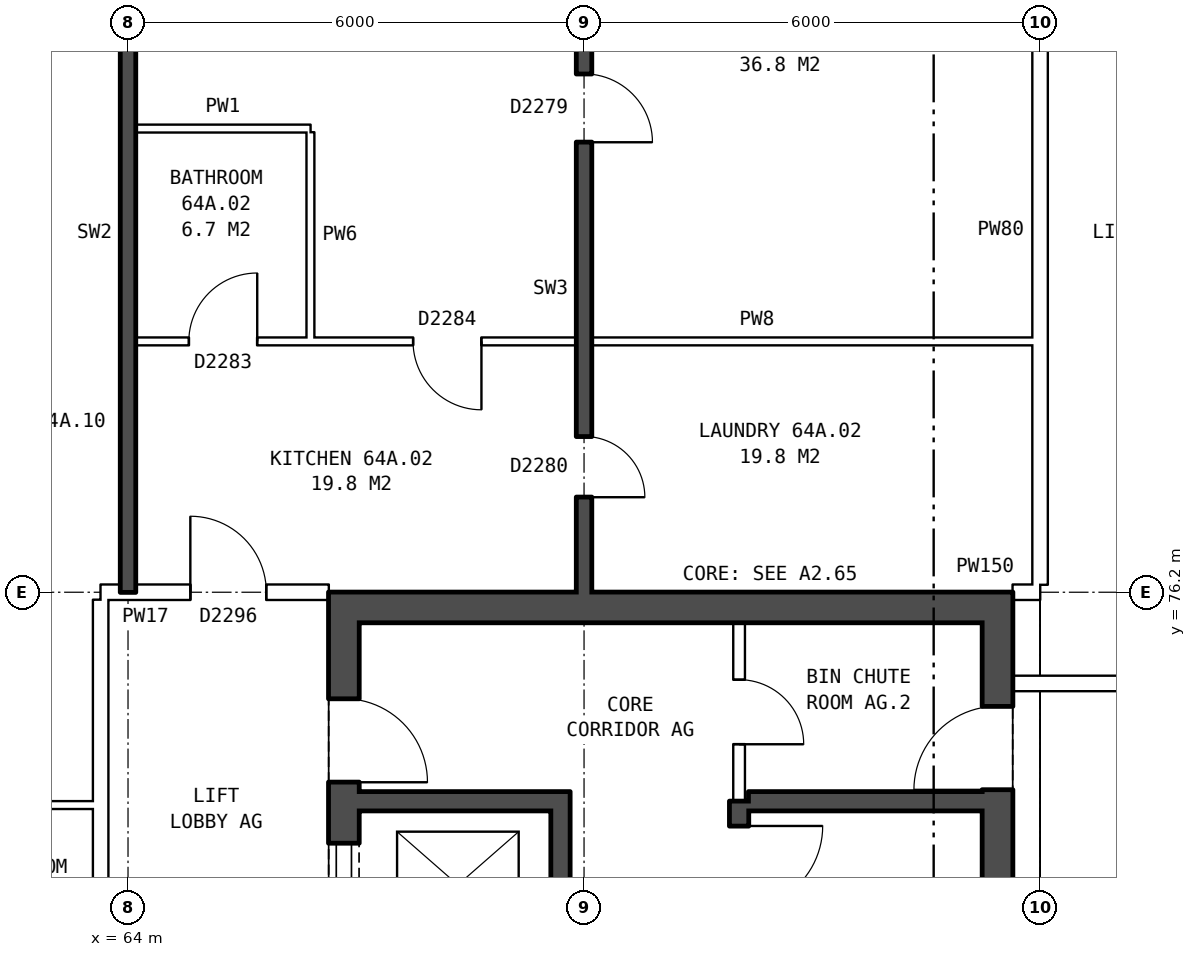
"""IFC4 building model, lengths in metres.
Left out: names, types, materials, properties, quantities, classifications, styles, units other than length and angle.
Written with IfcOpenShell. Run it as: python <this file> out.ifc"""

import sys

from ifc_helpers import new_model, si_unit, direction, frame, frame_2d, origin, place, context, subcontext, project, spatial, rectangle, extrude, element, fill, save


model = new_model("IFC4")
c1 = context("Model", 3, precision=1e-05, world=origin(), true_north=direction((0.0, 1.0)))
c2 = subcontext(c1, "Body", "Model", "MODEL_VIEW")
j1 = project(units=[si_unit("LENGTHUNIT", "METRE"), si_unit("PLANEANGLEUNIT", "RADIAN")], contexts=[c1])
p1 = place(None, origin())
s1 = spatial("IfcSite", under=j1, at=p1, CompositionType="ELEMENT")
p2 = place(p1, origin())
s2 = spatial("IfcBuilding", under=s1, at=p2, CompositionType="ELEMENT")
p3 = place(p2, frame((0.0, 0.0, 227.6)))
s3 = spatial("IfcBuildingStorey", under=s2, at=p3, CompositionType="ELEMENT", Elevation=227.6)
p4 = place(p3, frame((66.84, 63.8, 0.0), z_axis=(0.0, 0.0, 1.0), x_axis=(0.0, 1.0, 0.0)))
e1 = element("IfcWall", 1, at=p4, inside=s3, PredefinedType="SHEAR", context=c2, shape_type="SweptSolid", body=[
    extrude(rectangle(XDim=12.4, YDim=0.4, at=frame_2d((6.2, 0.0))), origin(), (0.0, 0.0, 1.0), 2.85),
])
p5 = place(p4, frame((1.325, 0.0, 0.0)))
e2 = element("IfcOpeningElement", 2, at=p5, cuts=e1, PredefinedType="OPENING", context=c2, shape_type="SweptSolid", body=[
    extrude(rectangle(XDim=1.1, YDim=2.1, at=frame_2d((0.55, 1.05))), frame((0.0, 0.21, 0.0), z_axis=(0.0, -1.0, 0.0), x_axis=(1.0, 0.0, 0.0)), (0.0, 0.0, 1.0), 0.42),
])
p6 = place(p4, frame((3.6, 0.0, 0.0)))
e3 = element("IfcOpeningElement", 3, at=p6, cuts=e1, PredefinedType="OPENING", context=c2, shape_type="SweptSolid", body=[
    extrude(rectangle(XDim=1.1, YDim=2.1, at=frame_2d((0.55, 1.05))), frame((0.0, 0.21, 0.0), z_axis=(0.0, -1.0, 0.0), x_axis=(1.0, 0.0, 0.0)), (0.0, 0.0, 1.0), 0.42),
])
p7 = place(p4, frame((5.8, 0.0, 0.0)))
e4 = element("IfcOpeningElement", 4, at=p7, cuts=e1, PredefinedType="OPENING", context=c2, shape_type="SweptSolid", body=[
    extrude(rectangle(XDim=1.1, YDim=2.1, at=frame_2d((0.55, 1.05))), frame((0.0, 0.21, 0.0), z_axis=(0.0, -1.0, 0.0), x_axis=(1.0, 0.0, 0.0)), (0.0, 0.0, 1.0), 0.42),
])
p8 = place(p4, frame((8.0, 0.0, 0.0)))
e5 = element("IfcOpeningElement", 5, at=p8, cuts=e1, PredefinedType="OPENING", context=c2, shape_type="SweptSolid", body=[
    extrude(rectangle(XDim=1.1, YDim=2.1, at=frame_2d((0.55, 1.05))), frame((0.0, 0.21, 0.0), z_axis=(0.0, -1.0, 0.0), x_axis=(1.0, 0.0, 0.0)), (0.0, 0.0, 1.0), 0.42),
])
p9 = place(p4, frame((9.9, 0.0, 0.0)))
e6 = element("IfcOpeningElement", 6, at=p9, cuts=e1, PredefinedType="OPENING", context=c2, shape_type="SweptSolid", body=[
    extrude(rectangle(XDim=1.1, YDim=2.1, at=frame_2d((0.55, 1.05))), frame((0.0, 0.21, 0.0), z_axis=(0.0, -1.0, 0.0), x_axis=(1.0, 0.0, 0.0)), (0.0, 0.0, 1.0), 0.42),
])
p10 = place(p3, frame((75.44, 63.8, 0.0), z_axis=(0.0, 0.0, 1.0), x_axis=(0.0, 1.0, 0.0)))
e7 = element("IfcWall", 7, at=p10, inside=s3, PredefinedType="SHEAR", context=c2, shape_type="SweptSolid", body=[
    extrude(rectangle(XDim=12.4, YDim=0.4, at=frame_2d((6.2, 0.0))), origin(), (0.0, 0.0, 1.0), 2.85),
])
p11 = place(p10, frame((9.8, 0.0, 0.0)))
e8 = element("IfcOpeningElement", 8, at=p11, cuts=e7, PredefinedType="OPENING", context=c2, shape_type="SweptSolid", body=[
    extrude(rectangle(XDim=1.1, YDim=2.1, at=frame_2d((0.55, 1.05))), frame((0.0, 0.21, 0.0), z_axis=(0.0, -1.0, 0.0), x_axis=(1.0, 0.0, 0.0)), (0.0, 0.0, 1.0), 0.42),
])
p12 = place(p3, frame((67.04, 76.0, 0.0), z_axis=(0.0, 0.0, 1.0), x_axis=(1.0, 0.0, 0.0)))
e9 = element("IfcWall", 9, at=p12, inside=s3, PredefinedType="SHEAR", context=c2, shape_type="SweptSolid", body=[
    extrude(rectangle(XDim=8.2, YDim=0.4, at=frame_2d((4.1, 0.0))), origin(), (0.0, 0.0, 1.0), 2.85),
])
p13 = place(p3, frame((67.04, 73.45, 0.0), z_axis=(0.0, 0.0, 1.0), x_axis=(1.0, 0.0, 0.0)))
e10 = element("IfcWall", 10, at=p13, inside=s3, PredefinedType="SHEAR", context=c2, shape_type="SweptSolid", body=[
    extrude(rectangle(XDim=2.525, YDim=0.25, at=frame_2d((1.262, 0.0))), origin(), (0.0, 0.0, 1.0), 2.85),
])
p14 = place(p3, frame((72.165, 73.45, 0.0), z_axis=(0.0, 0.0, 1.0), x_axis=(1.0, 0.0, 0.0)))
e11 = element("IfcWall", 11, at=p14, inside=s3, PredefinedType="SHEAR", context=c2, shape_type="SweptSolid", body=[
    extrude(rectangle(XDim=3.075, YDim=0.25, at=frame_2d((1.538, 0.0))), origin(), (0.0, 0.0, 1.0), 2.85),
])
p15 = place(p3, frame((69.69, 66.975, 0.0), z_axis=(0.0, 0.0, 1.0), x_axis=(0.0, 1.0, 0.0)))
e12 = element("IfcWall", 12, at=p15, inside=s3, PredefinedType="SHEAR", context=c2, shape_type="SweptSolid", body=[
    extrude(rectangle(XDim=6.6, YDim=0.25, at=frame_2d((3.3, 0.0))), origin(), (0.0, 0.0, 1.0), 2.85),
])
p16 = place(p3, frame((72.04, 66.225, 0.0), z_axis=(0.0, 0.0, 1.0), x_axis=(0.0, 1.0, 0.0)))
e13 = element("IfcWall", 13, at=p16, inside=s3, PredefinedType="SHEAR", context=c2, shape_type="SweptSolid", body=[
    extrude(rectangle(XDim=7.225, YDim=0.25, at=frame_2d((3.612, 0.0))), origin(), (0.0, 0.0, 1.0), 2.85),
])
p17 = place(p16, frame((5.8, 0.0, 0.0)))
e14 = element("IfcOpeningElement", 14, at=p17, cuts=e13, PredefinedType="OPENING", context=c2, shape_type="SweptSolid", body=[
    extrude(rectangle(XDim=1.1, YDim=2.1, at=frame_2d((0.55, 1.05))), frame((0.0, 0.135, 0.0), z_axis=(0.0, -1.0, 0.0), x_axis=(1.0, 0.0, 0.0)), (0.0, 0.0, 1.0), 0.27),
])
p18 = place(p3, frame((72.04, 73.45, 0.0), z_axis=(0.0, 0.0, 1.0), x_axis=(0.0, 1.0, 0.0)))
e15 = element("IfcWall", 15, at=p18, inside=s3, PredefinedType="PARTITIONING", context=c2, shape_type="SweptSolid", body=[
    extrude(rectangle(XDim=2.35, YDim=0.15, at=frame_2d((1.175, 0.0))), origin(), (0.0, 0.0, 1.0), 2.85),
])
p19 = place(p18, frame((0.75, 0.0, 0.0)))
e16 = element("IfcOpeningElement", 16, at=p19, cuts=e15, PredefinedType="OPENING", context=c2, shape_type="SweptSolid", body=[
    extrude(rectangle(XDim=0.85, YDim=2.1, at=frame_2d((0.425, 1.05))), frame((0.0, 0.085, 0.0), z_axis=(0.0, -1.0, 0.0), x_axis=(1.0, 0.0, 0.0)), (0.0, 0.0, 1.0), 0.17),
])
p20 = place(p3, frame((63.64, 63.9, 0.0), z_axis=(0.0, 0.0, 1.0), x_axis=(0.0, 1.0, 0.0)))
e17 = element("IfcWall", 17, at=p20, inside=s3, PredefinedType="PARTITIONING", context=c2, shape_type="SweptSolid", body=[
    extrude(rectangle(XDim=12.2, YDim=0.2, at=frame_2d((6.1, 0.0))), origin(), (0.0, 0.0, 1.0), 2.85),
])
p21 = place(p20, frame((5.1, 0.0, 0.0)))
e18 = element("IfcOpeningElement", 18, at=p21, cuts=e17, PredefinedType="OPENING", context=c2, shape_type="SweptSolid", body=[
    extrude(rectangle(XDim=2.0, YDim=2.1, at=frame_2d((1.0, 1.05))), frame((0.0, 0.11, 0.0), z_axis=(0.0, -1.0, 0.0), x_axis=(1.0, 0.0, 0.0)), (0.0, 0.0, 1.0), 0.22),
])
p22 = place(p3, frame((61.0, 73.4, 0.0), z_axis=(0.0, 0.0, 1.0), x_axis=(1.0, 0.0, 0.0)))
e19 = element("IfcWall", 19, at=p22, inside=s3, PredefinedType="PARTITIONING", context=c2, shape_type="SweptSolid", body=[
    extrude(rectangle(XDim=2.64, YDim=0.1, at=frame_2d((1.32, 0.0))), origin(), (0.0, 0.0, 1.0), 2.85),
])
p23 = place(p3, frame((75.64, 75.0, 0.0), z_axis=(0.0, 0.0, 1.0), x_axis=(1.0, 0.0, 0.0)))
e20 = element("IfcWall", 20, at=p23, inside=s3, PredefinedType="PARTITIONING", context=c2, shape_type="SweptSolid", body=[
    extrude(rectangle(XDim=7.585, YDim=0.2, at=frame_2d((3.792, 0.0))), origin(), (0.0, 0.0, 1.0), 2.85),
])
p24 = place(p23, frame((3.343, 0.0, 0.0)))
e21 = element("IfcOpeningElement", 21, at=p24, cuts=e20, PredefinedType="OPENING", context=c2, shape_type="SweptSolid", body=[
    extrude(rectangle(XDim=0.9, YDim=2.1, at=frame_2d((0.45, 1.05))), frame((0.0, 0.11, 0.0), z_axis=(0.0, -1.0, 0.0), x_axis=(1.0, 0.0, 0.0)), (0.0, 0.0, 1.0), 0.22),
])
p25 = place(p3, frame((63.64, 76.2, 0.0), z_axis=(0.0, 0.0, 1.0), x_axis=(1.0, 0.0, 0.0)))
e22 = element("IfcWall", 22, at=p25, inside=s3, PredefinedType="PARTITIONING", context=c2, shape_type="SweptSolid", body=[
    extrude(rectangle(XDim=3.0, YDim=0.2, at=frame_2d((1.5, 0.0))), origin(), (0.0, 0.0, 1.0), 2.85),
])
p26 = place(p25, frame((1.18, 0.0, 0.0)))
e23 = element("IfcOpeningElement", 23, at=p26, cuts=e22, PredefinedType="OPENING", context=c2, shape_type="SweptSolid", body=[
    extrude(rectangle(XDim=1.0, YDim=2.1, at=frame_2d((0.5, 1.05))), frame((0.0, 0.11, 0.0), z_axis=(0.0, -1.0, 0.0), x_axis=(1.0, 0.0, 0.0)), (0.0, 0.0, 1.0), 0.22),
])
p27 = place(p3, frame((75.64, 76.2, 0.0), z_axis=(0.0, 0.0, 1.0), x_axis=(1.0, 0.0, 0.0)))
e24 = element("IfcWall", 24, at=p27, inside=s3, PredefinedType="PARTITIONING", context=c2, shape_type="SweptSolid", body=[
    extrude(rectangle(XDim=0.36, YDim=0.2, at=frame_2d((0.18, 0.0))), origin(), (0.0, 0.0, 1.0), 2.85),
])
p28 = place(p3, frame((64.1, 79.5, 0.0), z_axis=(0.0, 0.0, 1.0), x_axis=(1.0, 0.0, 0.0)))
e25 = element("IfcWall", 25, at=p28, inside=s3, PredefinedType="PARTITIONING", context=c2, shape_type="SweptSolid", body=[
    extrude(rectangle(XDim=11.8, YDim=0.1, at=frame_2d((5.9, 0.0))), origin(), (0.0, 0.0, 1.0), 2.85),
])
p29 = place(p28, frame((3.65, 0.0, 0.0)))
e26 = element("IfcOpeningElement", 26, at=p29, cuts=e25, PredefinedType="OPENING", context=c2, shape_type="SweptSolid", body=[
    extrude(rectangle(XDim=0.9, YDim=2.1, at=frame_2d((0.45, 1.05))), frame((0.0, 0.06, 0.0), z_axis=(0.0, -1.0, 0.0), x_axis=(1.0, 0.0, 0.0)), (0.0, 0.0, 1.0), 0.12),
])
p30 = place(p28, frame((0.7, 0.0, 0.0)))
e27 = element("IfcOpeningElement", 27, at=p30, cuts=e25, PredefinedType="OPENING", context=c2, shape_type="SweptSolid", body=[
    extrude(rectangle(XDim=0.9, YDim=2.1, at=frame_2d((0.45, 1.05))), frame((0.0, 0.06, 0.0), z_axis=(0.0, -1.0, 0.0), x_axis=(1.0, 0.0, 0.0)), (0.0, 0.0, 1.0), 0.12),
])
p31 = place(p3, frame((64.1, 82.3, 0.0), z_axis=(0.0, 0.0, 1.0), x_axis=(1.0, 0.0, 0.0)))
e28 = element("IfcWall", 28, at=p31, inside=s3, PredefinedType="PARTITIONING", context=c2, shape_type="SweptSolid", body=[
    extrude(rectangle(XDim=2.3, YDim=0.1, at=frame_2d((1.15, 0.0))), origin(), (0.0, 0.0, 1.0), 2.85),
])
p32 = place(p3, frame((64.0, 76.2, 0.0), z_axis=(0.0, 0.0, 1.0), x_axis=(0.0, 1.0, 0.0)))
e29 = element("IfcWall", 29, at=p32, inside=s3, PredefinedType="SOLIDWALL", context=c2, shape_type="SweptSolid", body=[
    extrude(rectangle(XDim=9.44, YDim=0.2, at=frame_2d((4.72, 0.0))), origin(), (0.0, 0.0, 1.0), 2.85),
])
p33 = place(p3, frame((66.4, 79.55, 0.0), z_axis=(0.0, 0.0, 1.0), x_axis=(0.0, 1.0, 0.0)))
e30 = element("IfcWall", 30, at=p33, inside=s3, PredefinedType="PARTITIONING", context=c2, shape_type="SweptSolid", body=[
    extrude(rectangle(XDim=2.7, YDim=0.1, at=frame_2d((1.35, 0.0))), origin(), (0.0, 0.0, 1.0), 2.85),
])
p34 = place(p3, frame((70.0, 76.2, 0.0), z_axis=(0.0, 0.0, 1.0), x_axis=(0.0, 1.0, 0.0)))
e31 = element("IfcWall", 31, at=p34, inside=s3, PredefinedType="SOLIDWALL", context=c2, shape_type="SweptSolid", body=[
    extrude(rectangle(XDim=9.44, YDim=0.2, at=frame_2d((4.72, 0.0))), origin(), (0.0, 0.0, 1.0), 2.85),
])
p35 = place(p34, frame((5.92, 0.0, 0.0)))
e32 = element("IfcOpeningElement", 32, at=p35, cuts=e31, PredefinedType="OPENING", context=c2, shape_type="SweptSolid", body=[
    extrude(rectangle(XDim=0.9, YDim=2.1, at=frame_2d((0.45, 1.05))), frame((0.0, 0.11, 0.0), z_axis=(0.0, -1.0, 0.0), x_axis=(1.0, 0.0, 0.0)), (0.0, 0.0, 1.0), 0.22),
])
p36 = place(p34, frame((1.25, 0.0, 0.0)))
e33 = element("IfcOpeningElement", 33, at=p36, cuts=e31, PredefinedType="OPENING", context=c2, shape_type="SweptSolid", body=[
    extrude(rectangle(XDim=0.8, YDim=2.1, at=frame_2d((0.4, 1.05))), frame((0.0, 0.11, 0.0), z_axis=(0.0, -1.0, 0.0), x_axis=(1.0, 0.0, 0.0)), (0.0, 0.0, 1.0), 0.22),
])
p37 = place(p3, frame((76.0, 76.3, 0.0), z_axis=(0.0, 0.0, 1.0), x_axis=(0.0, 1.0, 0.0)))
e34 = element("IfcWall", 34, at=p37, inside=s3, PredefinedType="PARTITIONING", context=c2, shape_type="SweptSolid", body=[
    extrude(rectangle(XDim=9.34, YDim=0.2, at=frame_2d((4.67, 0.0))), origin(), (0.0, 0.0, 1.0), 2.85),
])
p38 = place(p8, origin())
e35 = element("IfcDoor", 35, at=p38, inside=s3, OperationType="DOUBLE_DOOR_SLIDING", PredefinedType="DOOR", context=c2, shape_type="SweptSolid", body=[
    extrude(rectangle(XDim=1.1, YDim=2.1, at=frame_2d((0.55, 1.05))), frame((0.0, -0.135, 0.0), z_axis=(0.0, -1.0, 0.0), x_axis=(1.0, 0.0, 0.0)), (0.0, 0.0, 1.0), 0.05),
])
fill(e5, e35)
p39 = place(p9, frame((1.1, 0.0, 0.0), z_axis=(0.0, 0.0, 1.0), x_axis=(-1.0, 0.0, 0.0)))
e36 = element("IfcDoor", 36, at=p39, inside=s3, OperationType="SINGLE_SWING_RIGHT", PredefinedType="DOOR", context=c2, shape_type="SweptSolid", body=[
    extrude(rectangle(XDim=1.1, YDim=2.1, at=frame_2d((0.55, 1.05))), frame((0.0, 0.185, 0.0), z_axis=(0.0, -1.0, 0.0), x_axis=(1.0, 0.0, 0.0)), (0.0, 0.0, 1.0), 0.05),
])
fill(e6, e36)
p40 = place(p17, frame((1.1, 0.0, 0.0), z_axis=(0.0, 0.0, 1.0), x_axis=(-1.0, 0.0, 0.0)))
e37 = element("IfcDoor", 37, at=p40, inside=s3, OperationType="SINGLE_SWING_LEFT", PredefinedType="DOOR", context=c2, shape_type="SweptSolid", body=[
    extrude(rectangle(XDim=1.1, YDim=2.1, at=frame_2d((0.55, 1.05))), frame((0.0, 0.025, 0.0), z_axis=(0.0, -1.0, 0.0), x_axis=(1.0, 0.0, 0.0)), (0.0, 0.0, 1.0), 0.05),
])
fill(e14, e37)
p41 = place(p19, frame((0.85, 0.0, 0.0), z_axis=(0.0, 0.0, 1.0), x_axis=(-1.0, 0.0, 0.0)))
e38 = element("IfcDoor", 38, at=p41, inside=s3, OperationType="SINGLE_SWING_RIGHT", PredefinedType="DOOR", context=c2, shape_type="SweptSolid", body=[
    extrude(rectangle(XDim=0.85, YDim=2.1, at=frame_2d((0.425, 1.05))), frame((0.0, 0.025, 0.0), z_axis=(0.0, -1.0, 0.0), x_axis=(1.0, 0.0, 0.0)), (0.0, 0.0, 1.0), 0.05),
])
fill(e16, e38)
p42 = place(p11, origin())
e39 = element("IfcDoor", 39, at=p42, inside=s3, OperationType="SINGLE_SWING_LEFT", PredefinedType="DOOR", context=c2, shape_type="SweptSolid", body=[
    extrude(rectangle(XDim=1.1, YDim=2.1, at=frame_2d((0.55, 1.05))), frame((0.0, 0.185, 0.0), z_axis=(0.0, -1.0, 0.0), x_axis=(1.0, 0.0, 0.0)), (0.0, 0.0, 1.0), 0.05),
])
fill(e8, e39)
p43 = place(p35, frame((0.9, 0.0, 0.0), z_axis=(0.0, 0.0, 1.0), x_axis=(-1.0, 0.0, 0.0)))
e40 = element("IfcDoor", 40, at=p43, inside=s3, OperationType="SINGLE_SWING_RIGHT", PredefinedType="DOOR", context=c2, shape_type="SweptSolid", body=[
    extrude(rectangle(XDim=0.9, YDim=2.1, at=frame_2d((0.45, 1.05))), frame((0.0, 0.025, 0.0), z_axis=(0.0, -1.0, 0.0), x_axis=(1.0, 0.0, 0.0)), (0.0, 0.0, 1.0), 0.05),
])
fill(e32, e40)
p44 = place(p26, origin())
e41 = element("IfcDoor", 41, at=p44, inside=s3, OperationType="SINGLE_SWING_LEFT", PredefinedType="DOOR", context=c2, shape_type="SweptSolid", body=[
    extrude(rectangle(XDim=1.0, YDim=2.1, at=frame_2d((0.5, 1.05))), frame((0.0, 0.025, 0.0), z_axis=(0.0, -1.0, 0.0), x_axis=(1.0, 0.0, 0.0)), (0.0, 0.0, 1.0), 0.05),
])
fill(e23, e41)
p45 = place(p29, frame((0.9, 0.0, 0.0), z_axis=(0.0, 0.0, 1.0), x_axis=(-1.0, 0.0, 0.0)))
e42 = element("IfcDoor", 42, at=p45, inside=s3, OperationType="SINGLE_SWING_LEFT", PredefinedType="DOOR", context=c2, shape_type="SweptSolid", body=[
    extrude(rectangle(XDim=0.9, YDim=2.1, at=frame_2d((0.45, 1.05))), frame((0.0, 0.025, 0.0), z_axis=(0.0, -1.0, 0.0), x_axis=(1.0, 0.0, 0.0)), (0.0, 0.0, 1.0), 0.05),
])
fill(e26, e42)
p46 = place(p36, frame((0.8, 0.0, 0.0), z_axis=(0.0, 0.0, 1.0), x_axis=(-1.0, 0.0, 0.0)))
e43 = element("IfcDoor", 43, at=p46, inside=s3, OperationType="SINGLE_SWING_RIGHT", PredefinedType="DOOR", context=c2, shape_type="SweptSolid", body=[
    extrude(rectangle(XDim=0.8, YDim=2.1, at=frame_2d((0.4, 1.05))), frame((0.0, 0.025, 0.0), z_axis=(0.0, -1.0, 0.0), x_axis=(1.0, 0.0, 0.0)), (0.0, 0.0, 1.0), 0.05),
])
fill(e33, e43)
p47 = place(p30, origin())
e44 = element("IfcDoor", 44, at=p47, inside=s3, OperationType="SINGLE_SWING_RIGHT", PredefinedType="DOOR", context=c2, shape_type="SweptSolid", body=[
    extrude(rectangle(XDim=0.9, YDim=2.1, at=frame_2d((0.45, 1.05))), frame((0.0, 0.025, 0.0), z_axis=(0.0, -1.0, 0.0), x_axis=(1.0, 0.0, 0.0)), (0.0, 0.0, 1.0), 0.05),
])
fill(e27, e44)
save(model, sys.argv[1])
